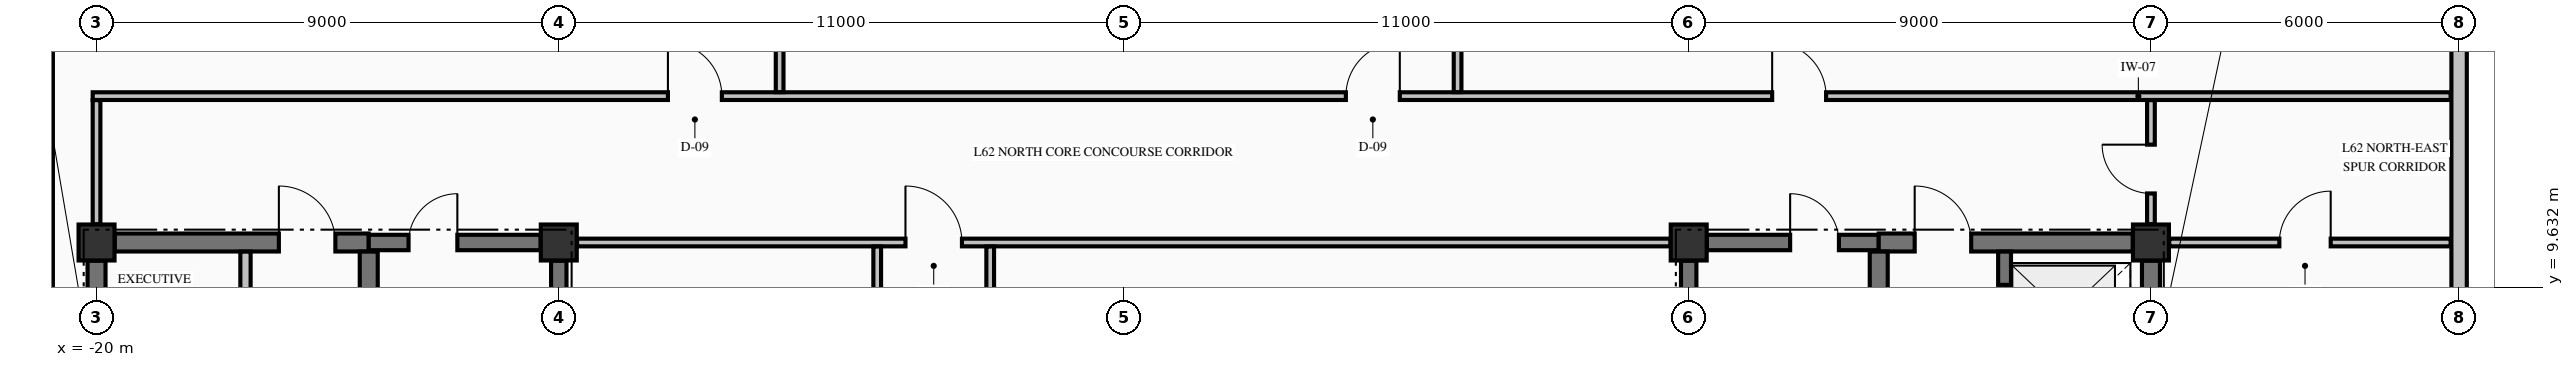
"""IFC4 building model, lengths in metres.
Left out: names, types, materials, properties, quantities, classifications, styles, units other than length and angle.
Written with IfcOpenShell. Run it as: python <this file> out.ifc"""

import sys

from ifc_helpers import new_model, si_unit, direction, frame, frame_2d, origin, origin_2d, place, context, subcontext, project, spatial, rectangle, extrude, element, fill, save


model = new_model("IFC4")
c1 = context("Model", 3, precision=1e-05, world=origin(), true_north=direction((0.0, 1.0)))
c2 = subcontext(c1, "Body", "Model", "MODEL_VIEW")
j1 = project(units=[si_unit("LENGTHUNIT", "METRE"), si_unit("PLANEANGLEUNIT", "RADIAN")], contexts=[c1])
p1 = place(None, origin())
s1 = spatial("IfcSite", under=j1, at=p1, CompositionType="ELEMENT")
p2 = place(p1, origin())
s2 = spatial("IfcBuilding", under=s1, at=p2, CompositionType="ELEMENT")
p3 = place(p2, frame((0.0, 0.0, 236.51)))
s3 = spatial("IfcBuildingStorey", under=s2, at=p3, CompositionType="ELEMENT", Elevation=236.51)
for number, where, z_axis, x_axis in (
    (1, (-20.0, 10.5, -0.25), (0.0, 0.0, 1.0), (1.0, 0.0, 0.0)),
    (2, (-11.0, 10.5, -0.25), (0.0, 0.0, 1.0), (1.0, 0.0, 0.0)),
    (3, (11.0, 10.5, -0.25), (0.0, 0.0, 1.0), (1.0, 0.0, 0.0)),
    (4, (20.0, 10.5, -0.25), (0.0, 0.0, 1.0), (1.0, 0.0, 0.0)),
):
    element("IfcColumn", number, at=place(p3, frame(where, z_axis=z_axis, x_axis=x_axis)), inside=s3, PredefinedType="COLUMN", context=c2, shape_type="SweptSolid", body=[
        extrude(rectangle(XDim=0.7, YDim=0.7, at=origin_2d()), origin(), (0.0, 0.0, 1.0), 3.23),
    ])
for number, where, z_axis, x_axis in (
    (5, (26.0, 9.455, 0.0), (0.0, 0.0, 1.0), (0.0, 1.0, 0.0)),
    (6, (-21.0, 17.545, 0.0), (0.0, 0.0, 1.0), (0.0, -1.0, 0.0)),
):
    element("IfcWall", number, at=place(p3, frame(where, z_axis=z_axis, x_axis=x_axis)), inside=s3, PredefinedType="STANDARD", context=c2, shape_type="SweptSolid", body=[
        extrude(rectangle(XDim=8.09, YDim=0.3, at=frame_2d((4.045, 0.0))), origin(), (0.0, 0.0, 1.0), 2.372),
    ])
p4 = place(p3, frame((-19.646, 10.5, 0.0), z_axis=(0.0, 0.0, 1.0), x_axis=(1.0, 0.0, 0.0)))
e7 = element("IfcWall", 7, at=p4, inside=s3, PredefinedType="SHEAR", context=c2, shape_type="SweptSolid", body=[
    extrude(rectangle(XDim=4.946, YDim=0.35, at=frame_2d((2.473, 0.0))), origin(), (0.0, 0.0, 1.0), 2.98),
])
p5 = place(p4, frame((3.196, 0.0, 0.0)))
e8 = element("IfcOpeningElement", 8, at=p5, cuts=e7, PredefinedType="OPENING", context=c2, shape_type="SweptSolid", body=[
    extrude(rectangle(XDim=1.1, YDim=2.15, at=frame_2d((0.55, 1.075))), frame((0.0, 0.185, 0.0), z_axis=(0.0, -1.0, 0.0), x_axis=(1.0, 0.0, 0.0)), (0.0, 0.0, 1.0), 0.37),
])
p6 = place(p3, frame((-14.7, 10.5, 0.0), z_axis=(0.0, 0.0, 1.0), x_axis=(1.0, 0.0, 0.0)))
e9 = element("IfcWall", 9, at=p6, inside=s3, PredefinedType="SHEAR", context=c2, shape_type="SweptSolid", body=[
    extrude(rectangle(XDim=3.346, YDim=0.3, at=frame_2d((1.673, 0.0))), origin(), (0.0, 0.0, 1.0), 2.98),
])
p7 = place(p6, frame((0.775, 0.0, 0.0)))
e10 = element("IfcOpeningElement", 10, at=p7, cuts=e9, PredefinedType="OPENING", context=c2, shape_type="SweptSolid", body=[
    extrude(rectangle(XDim=0.95, YDim=2.15, at=frame_2d((0.475, 1.075))), frame((0.0, 0.16, 0.0), z_axis=(0.0, -1.0, 0.0), x_axis=(1.0, 0.0, 0.0)), (0.0, 0.0, 1.0), 0.32),
])
p8 = place(p3, frame((11.354, 10.5, 0.0), z_axis=(0.0, 0.0, 1.0), x_axis=(1.0, 0.0, 0.0)))
e11 = element("IfcWall", 11, at=p8, inside=s3, PredefinedType="SHEAR", context=c2, shape_type="SweptSolid", body=[
    extrude(rectangle(XDim=3.346, YDim=0.3, at=frame_2d((1.673, 0.0))), origin(), (0.0, 0.0, 1.0), 2.98),
])
p9 = place(p8, frame((1.621, 0.0, 0.0)))
e12 = element("IfcOpeningElement", 12, at=p9, cuts=e11, PredefinedType="OPENING", context=c2, shape_type="SweptSolid", body=[
    extrude(rectangle(XDim=0.95, YDim=2.15, at=frame_2d((0.475, 1.075))), frame((0.0, 0.16, 0.0), z_axis=(0.0, -1.0, 0.0), x_axis=(1.0, 0.0, 0.0)), (0.0, 0.0, 1.0), 0.32),
])
p10 = place(p3, frame((14.7, 10.5, 0.0), z_axis=(0.0, 0.0, 1.0), x_axis=(1.0, 0.0, 0.0)))
e13 = element("IfcWall", 13, at=p10, inside=s3, PredefinedType="SHEAR", context=c2, shape_type="SweptSolid", body=[
    extrude(rectangle(XDim=4.946, YDim=0.35, at=frame_2d((2.473, 0.0))), origin(), (0.0, 0.0, 1.0), 2.98),
])
p11 = place(p10, frame((0.7, 0.0, 0.0)))
e14 = element("IfcOpeningElement", 14, at=p11, cuts=e13, PredefinedType="OPENING", context=c2, shape_type="SweptSolid", body=[
    extrude(rectangle(XDim=1.1, YDim=2.15, at=frame_2d((0.55, 1.075))), frame((0.0, 0.185, 0.0), z_axis=(0.0, -1.0, 0.0), x_axis=(1.0, 0.0, 0.0)), (0.0, 0.0, 1.0), 0.37),
])
p12 = place(p3, frame((-10.644, 10.5, 0.0), z_axis=(0.0, 0.0, 1.0), x_axis=(1.0, 0.0, 0.0)))
e15 = element("IfcWall", 15, at=p12, inside=s3, PredefinedType="PARTITIONING", context=c2, shape_type="SweptSolid", body=[
    extrude(rectangle(XDim=21.288, YDim=0.15, at=frame_2d((10.644, 0.0))), origin(), (0.0, 0.0, 1.0), 2.98),
])
p13 = place(p12, frame((6.394, 0.0, 0.0)))
e16 = element("IfcOpeningElement", 16, at=p13, cuts=e15, PredefinedType="OPENING", context=c2, shape_type="SweptSolid", body=[
    extrude(rectangle(XDim=1.1, YDim=2.15, at=frame_2d((0.55, 1.075))), frame((0.0, 0.085, 0.0), z_axis=(0.0, -1.0, 0.0), x_axis=(1.0, 0.0, 0.0)), (0.0, 0.0, 1.0), 0.17),
])
p14 = place(p3, frame((20.356, 10.5, 0.0), z_axis=(0.0, 0.0, 1.0), x_axis=(1.0, 0.0, 0.0)))
e17 = element("IfcWall", 17, at=p14, inside=s3, PredefinedType="PARTITIONING", context=c2, shape_type="SweptSolid", body=[
    extrude(rectangle(XDim=5.479, YDim=0.15, at=frame_2d((2.74, 0.0))), origin(), (0.0, 0.0, 1.0), 2.98),
])
p15 = place(p14, frame((2.144, 0.0, 0.0)))
e18 = element("IfcOpeningElement", 18, at=p15, cuts=e17, PredefinedType="OPENING", context=c2, shape_type="SweptSolid", body=[
    extrude(rectangle(XDim=1.0, YDim=2.15, at=frame_2d((0.5, 1.075))), frame((0.0, 0.085, 0.0), z_axis=(0.0, -1.0, 0.0), x_axis=(1.0, 0.0, 0.0)), (0.0, 0.0, 1.0), 0.17),
])
p16 = place(p3, frame((-20.075, 13.35, 0.0), z_axis=(0.0, 0.0, 1.0), x_axis=(1.0, 0.0, 0.0)))
e19 = element("IfcWall", 19, at=p16, inside=s3, PredefinedType="PARTITIONING", context=c2, shape_type="SweptSolid", body=[
    extrude(rectangle(XDim=45.91, YDim=0.15, at=frame_2d((22.955, 0.0))), origin(), (0.0, 0.0, 1.0), 2.98),
])
p17 = place(p16, frame((11.2, 0.0, 0.0)))
e20 = element("IfcOpeningElement", 20, at=p17, cuts=e19, PredefinedType="OPENING", context=c2, shape_type="SweptSolid", body=[
    extrude(rectangle(XDim=1.05, YDim=2.15, at=frame_2d((0.525, 1.075))), frame((0.0, 0.085, 0.0), z_axis=(0.0, -1.0, 0.0), x_axis=(1.0, 0.0, 0.0)), (0.0, 0.0, 1.0), 0.17),
])
p18 = place(p16, frame((24.4, 0.0, 0.0)))
e21 = element("IfcOpeningElement", 21, at=p18, cuts=e19, PredefinedType="OPENING", context=c2, shape_type="SweptSolid", body=[
    extrude(rectangle(XDim=1.05, YDim=2.15, at=frame_2d((0.525, 1.075))), frame((0.0, 0.085, 0.0), z_axis=(0.0, -1.0, 0.0), x_axis=(1.0, 0.0, 0.0)), (0.0, 0.0, 1.0), 0.17),
])
p19 = place(p16, frame((32.7, 0.0, 0.0)))
e22 = element("IfcOpeningElement", 22, at=p19, cuts=e19, PredefinedType="OPENING", context=c2, shape_type="SweptSolid", body=[
    extrude(rectangle(XDim=1.05, YDim=2.15, at=frame_2d((0.525, 1.075))), frame((0.0, 0.085, 0.0), z_axis=(0.0, -1.0, 0.0), x_axis=(1.0, 0.0, 0.0)), (0.0, 0.0, 1.0), 0.17),
])
p20 = place(p3, frame((-20.0, 5.327, 0.0), z_axis=(0.0, 0.0, 1.0), x_axis=(0.0, 1.0, 0.0)))
e23 = element("IfcWall", 23, at=p20, inside=s3, PredefinedType="SHEAR", context=c2, shape_type="SweptSolid", body=[
    extrude(rectangle(XDim=4.819, YDim=0.35, at=frame_2d((2.41, 0.0))), origin(), (0.0, 0.0, 1.0), 2.98),
])
p21 = place(p3, frame((-14.7, 5.852, 0.0), z_axis=(0.0, 0.0, 1.0), x_axis=(0.0, 1.0, 0.0)))
e24 = element("IfcWall", 24, at=p21, inside=s3, PredefinedType="SHEAR", context=c2, shape_type="SweptSolid", body=[
    extrude(rectangle(XDim=4.471, YDim=0.35, at=frame_2d((2.235, 0.0))), origin(), (0.0, 0.0, 1.0), 2.98),
])
for number, where, z_axis, x_axis in (
    (25, (-11.0, 5.852, 0.0), (0.0, 0.0, 1.0), (0.0, 1.0, 0.0)),
    (26, (11.0, 5.852, 0.0), (0.0, 0.0, 1.0), (0.0, 1.0, 0.0)),
):
    element("IfcWall", number, at=place(p3, frame(where, z_axis=z_axis, x_axis=x_axis)), inside=s3, PredefinedType="SHEAR", context=c2, shape_type="SweptSolid", body=[
        extrude(rectangle(XDim=4.294, YDim=0.3, at=frame_2d((2.147, 0.0))), origin(), (0.0, 0.0, 1.0), 2.98),
    ])
p22 = place(p3, frame((14.7, 5.852, 0.0), z_axis=(0.0, 0.0, 1.0), x_axis=(0.0, 1.0, 0.0)))
e27 = element("IfcWall", 27, at=p22, inside=s3, PredefinedType="SHEAR", context=c2, shape_type="SweptSolid", body=[
    extrude(rectangle(XDim=4.471, YDim=0.35, at=frame_2d((2.235, 0.0))), origin(), (0.0, 0.0, 1.0), 2.98),
])
p23 = place(p3, frame((17.15, 7.877, 0.0), z_axis=(0.0, 0.0, 1.0), x_axis=(0.0, 1.0, 0.0)))
e28 = element("IfcWall", 28, at=p23, inside=s3, PredefinedType="SOLIDWALL", context=c2, shape_type="SweptSolid", body=[
    extrude(rectangle(XDim=2.446, YDim=0.25, at=frame_2d((1.223, 0.0))), origin(), (0.0, 0.0, 1.0), 2.98),
])
p24 = place(p23, frame((0.698, 0.0, 0.0)))
e29 = element("IfcOpeningElement", 29, at=p24, cuts=e28, PredefinedType="OPENING", context=c2, shape_type="SweptSolid", body=[
    extrude(rectangle(XDim=1.1, YDim=2.2, at=frame_2d((0.55, 1.1))), frame((0.0, 0.135, 0.0), z_axis=(0.0, -1.0, 0.0), x_axis=(1.0, 0.0, 0.0)), (0.0, 0.0, 1.0), 0.27),
])
p25 = place(p3, frame((20.0, 7.877, 0.0), z_axis=(0.0, 0.0, 1.0), x_axis=(0.0, 1.0, 0.0)))
e30 = element("IfcWall", 30, at=p25, inside=s3, PredefinedType="SHEAR", context=c2, shape_type="SweptSolid", body=[
    extrude(rectangle(XDim=2.269, YDim=0.35, at=frame_2d((1.135, 0.0))), origin(), (0.0, 0.0, 1.0), 2.98),
])
p26 = place(p3, frame((-20.0, 10.856, 0.0), z_axis=(0.0, 0.0, 1.0), x_axis=(0.0, 1.0, 0.0)))
e31 = element("IfcWall", 31, at=p26, inside=s3, PredefinedType="PARTITIONING", context=c2, shape_type="SweptSolid", body=[
    extrude(rectangle(XDim=2.416, YDim=0.15, at=frame_2d((1.208, 0.0))), origin(), (0.0, 0.0, 1.0), 2.57),
])
p27 = place(p3, frame((-17.1, 5.328, 0.0), z_axis=(0.0, 0.0, 1.0), x_axis=(0.0, 1.0, 0.0)))
e32 = element("IfcWall", 32, at=p27, inside=s3, PredefinedType="PARTITIONING", context=c2, shape_type="SweptSolid", body=[
    extrude(rectangle(XDim=4.994, YDim=0.2, at=frame_2d((2.497, 0.0))), origin(), (0.0, 0.0, 1.0), 2.98),
])
p28 = place(p27, frame((2.072, 0.0, 0.0)))
e33 = element("IfcOpeningElement", 33, at=p28, cuts=e32, PredefinedType="OPENING", context=c2, shape_type="SweptSolid", body=[
    extrude(rectangle(XDim=0.9, YDim=2.15, at=frame_2d((0.45, 1.075))), frame((0.0, 0.11, 0.0), z_axis=(0.0, -1.0, 0.0), x_axis=(1.0, 0.0, 0.0)), (0.0, 0.0, 1.0), 0.22),
])
p29 = place(p3, frame((-6.7, 13.428, 0.0), z_axis=(0.0, 0.0, 1.0), x_axis=(0.0, 1.0, 0.0)))
e34 = element("IfcWall", 34, at=p29, inside=s3, PredefinedType="PARTITIONING", context=c2, shape_type="SweptSolid", body=[
    extrude(rectangle(XDim=9.907, YDim=0.15, at=frame_2d((4.954, 0.0))), origin(), (0.0, 0.0, 1.0), 2.98),
])
for number, where, z_axis, x_axis in (
    (35, (-4.8, 2.978, 0.0), (0.0, 0.0, 1.0), (0.0, 1.0, 0.0)),
    (36, (-2.6, 2.978, 0.0), (0.0, 0.0, 1.0), (0.0, 1.0, 0.0)),
):
    element("IfcWall", number, at=place(p3, frame(where, z_axis=z_axis, x_axis=x_axis)), inside=s3, PredefinedType="PARTITIONING", context=c2, shape_type="SweptSolid", body=[
        extrude(rectangle(XDim=7.444, YDim=0.15, at=frame_2d((3.722, 0.0))), origin(), (0.0, 0.0, 1.0), 2.98),
    ])
p30 = place(p3, frame((6.5, 13.428, 0.0), z_axis=(0.0, 0.0, 1.0), x_axis=(0.0, 1.0, 0.0)))
e37 = element("IfcWall", 37, at=p30, inside=s3, PredefinedType="PARTITIONING", context=c2, shape_type="SweptSolid", body=[
    extrude(rectangle(XDim=9.907, YDim=0.15, at=frame_2d((4.954, 0.0))), origin(), (0.0, 0.0, 1.0), 2.98),
])
p31 = place(p3, frame((20.0, 10.856, 0.0), z_axis=(0.0, 0.0, 1.0), x_axis=(0.0, 1.0, 0.0)))
e38 = element("IfcWall", 38, at=p31, inside=s3, PredefinedType="PARTITIONING", context=c2, shape_type="SweptSolid", body=[
    extrude(rectangle(XDim=2.416, YDim=0.15, at=frame_2d((1.208, 0.0))), origin(), (0.0, 0.0, 1.0), 2.98),
])
p32 = place(p31, frame((0.599, 0.0, 0.0)))
e39 = element("IfcOpeningElement", 39, at=p32, cuts=e38, PredefinedType="OPENING", context=c2, shape_type="SweptSolid", body=[
    extrude(rectangle(XDim=0.95, YDim=2.15, at=frame_2d((0.475, 1.075))), frame((0.0, 0.085, 0.0), z_axis=(0.0, -1.0, 0.0), x_axis=(1.0, 0.0, 0.0)), (0.0, 0.0, 1.0), 0.17),
])
p33 = place(p7, origin())
e40 = element("IfcDoor", 40, at=p33, inside=s3, OperationType="SINGLE_SWING_RIGHT", PredefinedType="DOOR", context=c2, shape_type="SweptSolid", body=[
    extrude(rectangle(XDim=0.95, YDim=2.15, at=frame_2d((0.475, 1.075))), frame((0.0, 0.025, 0.0), z_axis=(0.0, -1.0, 0.0), x_axis=(1.0, 0.0, 0.0)), (0.0, 0.0, 1.0), 0.05),
])
fill(e10, e40)
p34 = place(p9, origin())
e41 = element("IfcDoor", 41, at=p34, inside=s3, OperationType="SINGLE_SWING_LEFT", PredefinedType="DOOR", context=c2, shape_type="SweptSolid", body=[
    extrude(rectangle(XDim=0.95, YDim=2.15, at=frame_2d((0.475, 1.075))), frame((0.0, 0.025, 0.0), z_axis=(0.0, -1.0, 0.0), x_axis=(1.0, 0.0, 0.0)), (0.0, 0.0, 1.0), 0.05),
])
fill(e12, e41)
p35 = place(p5, origin())
e42 = element("IfcDoor", 42, at=p35, inside=s3, OperationType="SINGLE_SWING_LEFT", PredefinedType="DOOR", context=c2, shape_type="SweptSolid", body=[
    extrude(rectangle(XDim=1.1, YDim=2.15, at=frame_2d((0.55, 1.075))), frame((0.0, 0.025, 0.0), z_axis=(0.0, -1.0, 0.0), x_axis=(1.0, 0.0, 0.0)), (0.0, 0.0, 1.0), 0.05),
])
fill(e8, e42)
p36 = place(p24, origin())
e43 = element("IfcDoor", 43, at=p36, inside=s3, OperationType="SLIDING_TO_RIGHT", PredefinedType="DOOR", context=c2, shape_type="SweptSolid", body=[
    extrude(rectangle(XDim=1.1, YDim=2.2, at=frame_2d((0.55, 1.1))), frame((0.0, 0.025, 0.0), z_axis=(0.0, -1.0, 0.0), x_axis=(1.0, 0.0, 0.0)), (0.0, 0.0, 1.0), 0.05),
])
fill(e29, e43)
p37 = place(p11, origin())
e44 = element("IfcDoor", 44, at=p37, inside=s3, OperationType="SINGLE_SWING_LEFT", PredefinedType="DOOR", context=c2, shape_type="SweptSolid", body=[
    extrude(rectangle(XDim=1.1, YDim=2.15, at=frame_2d((0.55, 1.075))), frame((0.0, 0.025, 0.0), z_axis=(0.0, -1.0, 0.0), x_axis=(1.0, 0.0, 0.0)), (0.0, 0.0, 1.0), 0.05),
])
fill(e14, e44)
p38 = place(p13, origin())
e45 = element("IfcDoor", 45, at=p38, inside=s3, OperationType="SINGLE_SWING_LEFT", PredefinedType="DOOR", context=c2, shape_type="SweptSolid", body=[
    extrude(rectangle(XDim=1.1, YDim=2.15, at=frame_2d((0.55, 1.075))), frame((0.0, 0.025, 0.0), z_axis=(0.0, -1.0, 0.0), x_axis=(1.0, 0.0, 0.0)), (0.0, 0.0, 1.0), 0.05),
])
fill(e16, e45)
p39 = place(p17, origin())
e46 = element("IfcDoor", 46, at=p39, inside=s3, OperationType="SINGLE_SWING_LEFT", PredefinedType="DOOR", context=c2, shape_type="SweptSolid", body=[
    extrude(rectangle(XDim=1.05, YDim=2.15, at=frame_2d((0.525, 1.075))), frame((0.0, 0.025, 0.0), z_axis=(0.0, -1.0, 0.0), x_axis=(1.0, 0.0, 0.0)), (0.0, 0.0, 1.0), 0.05),
])
fill(e20, e46)
p40 = place(p18, origin())
e47 = element("IfcDoor", 47, at=p40, inside=s3, OperationType="SINGLE_SWING_RIGHT", PredefinedType="DOOR", context=c2, shape_type="SweptSolid", body=[
    extrude(rectangle(XDim=1.05, YDim=2.15, at=frame_2d((0.525, 1.075))), frame((0.0, 0.025, 0.0), z_axis=(0.0, -1.0, 0.0), x_axis=(1.0, 0.0, 0.0)), (0.0, 0.0, 1.0), 0.05),
])
fill(e21, e47)
p41 = place(p19, origin())
e48 = element("IfcDoor", 48, at=p41, inside=s3, OperationType="SINGLE_SWING_LEFT", PredefinedType="DOOR", context=c2, shape_type="SweptSolid", body=[
    extrude(rectangle(XDim=1.05, YDim=2.15, at=frame_2d((0.525, 1.075))), frame((0.0, 0.025, 0.0), z_axis=(0.0, -1.0, 0.0), x_axis=(1.0, 0.0, 0.0)), (0.0, 0.0, 1.0), 0.05),
])
fill(e22, e48)
p42 = place(p32, origin())
e49 = element("IfcDoor", 49, at=p42, inside=s3, OperationType="SINGLE_SWING_RIGHT", PredefinedType="DOOR", context=c2, shape_type="SweptSolid", body=[
    extrude(rectangle(XDim=0.95, YDim=2.15, at=frame_2d((0.475, 1.075))), frame((0.0, 0.025, 0.0), z_axis=(0.0, -1.0, 0.0), x_axis=(1.0, 0.0, 0.0)), (0.0, 0.0, 1.0), 0.05),
])
fill(e39, e49)
p43 = place(p15, origin())
e50 = element("IfcDoor", 50, at=p43, inside=s3, OperationType="SINGLE_SWING_RIGHT", PredefinedType="DOOR", context=c2, shape_type="SweptSolid", body=[
    extrude(rectangle(XDim=1.0, YDim=2.15, at=frame_2d((0.5, 1.075))), frame((0.0, 0.025, 0.0), z_axis=(0.0, -1.0, 0.0), x_axis=(1.0, 0.0, 0.0)), (0.0, 0.0, 1.0), 0.05),
])
fill(e18, e50)
save(model, sys.argv[1])
